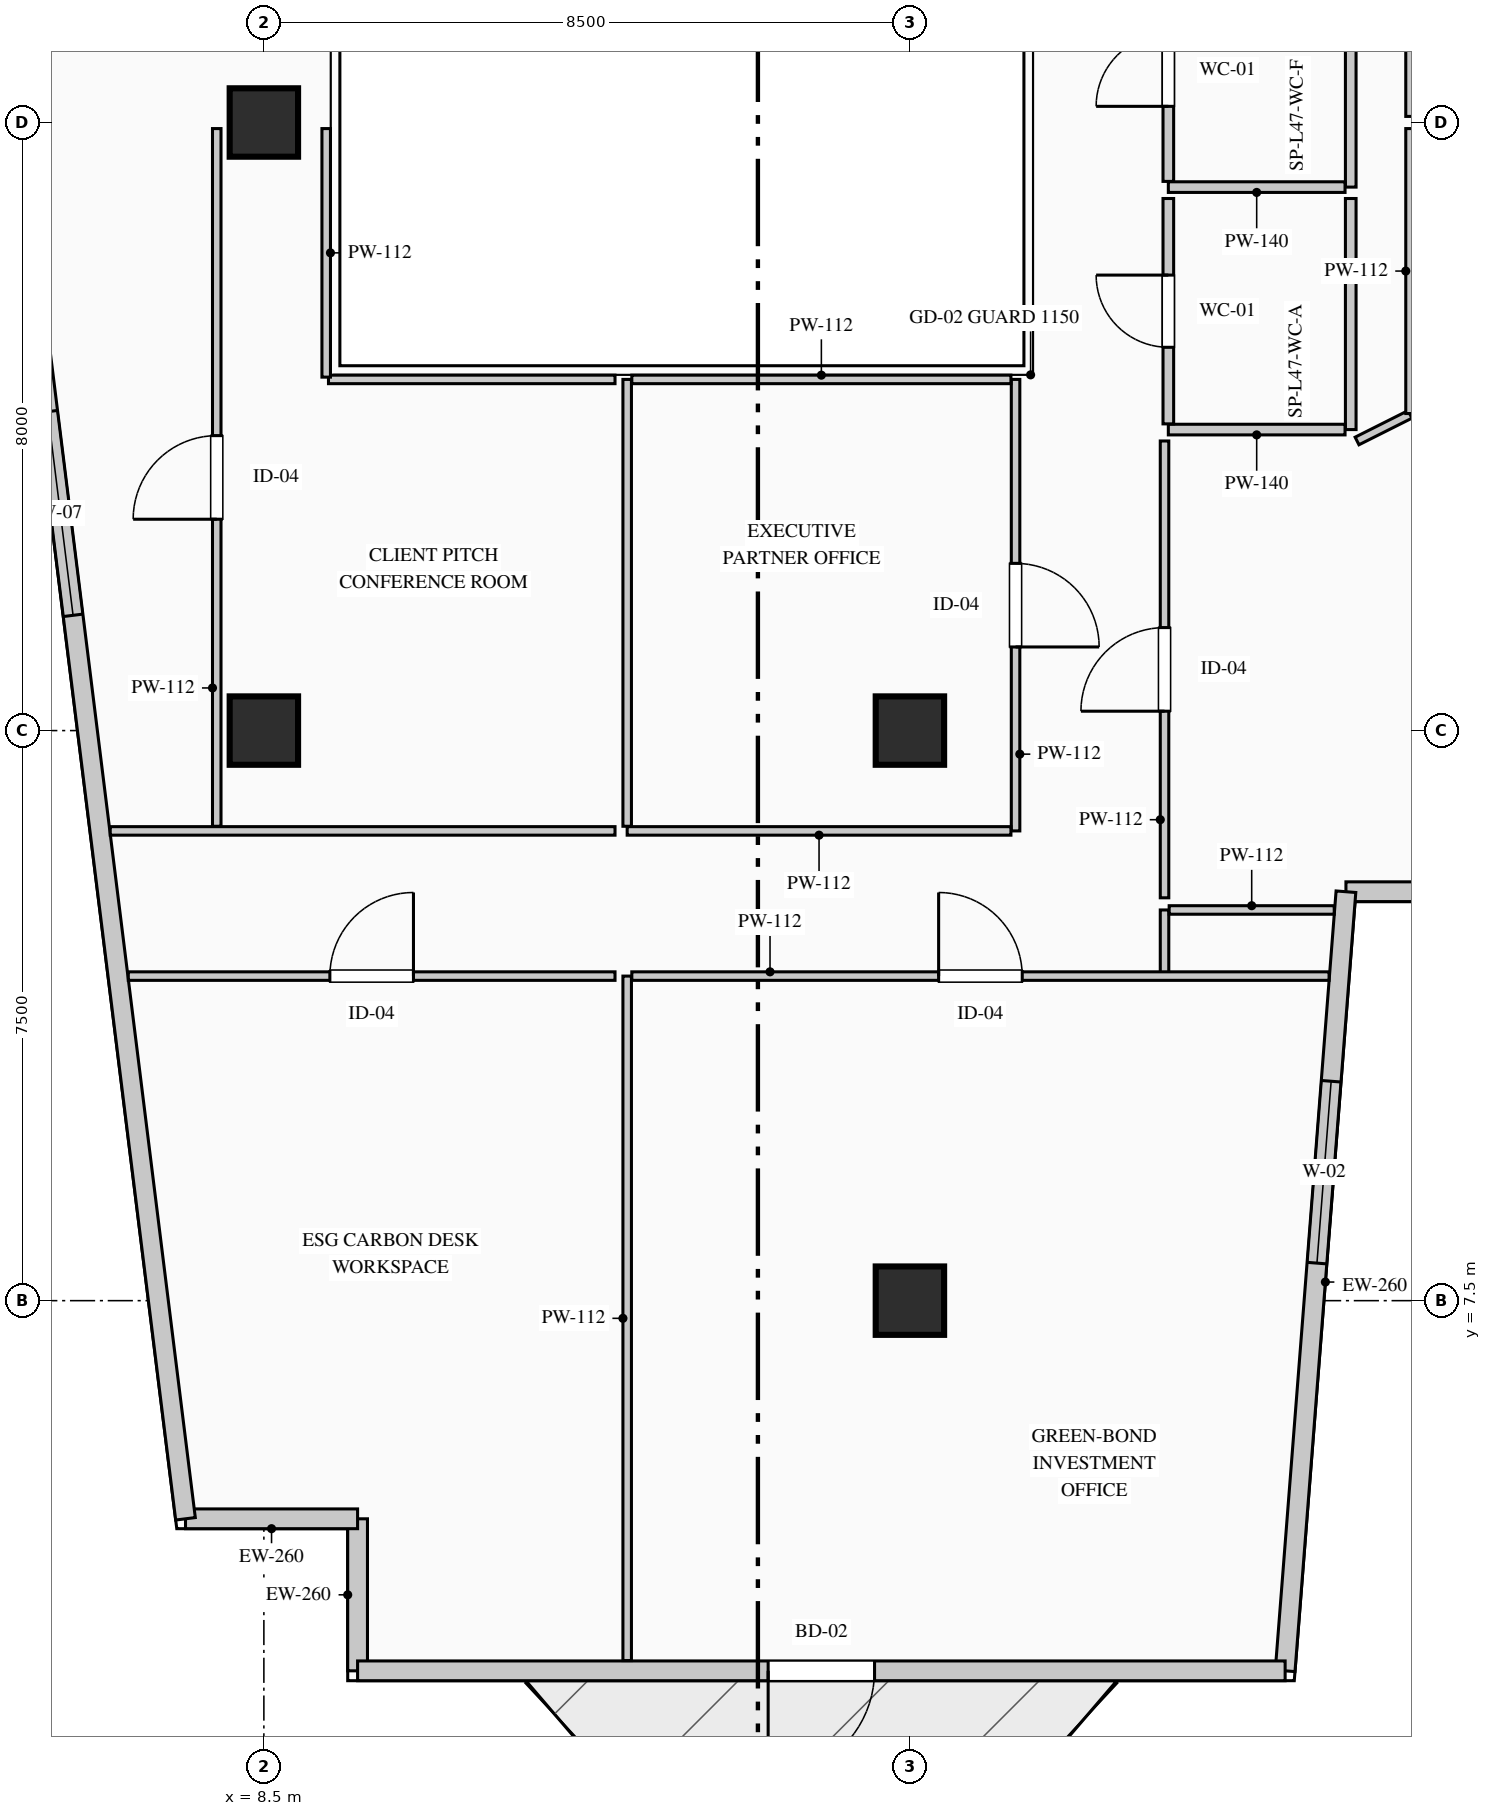
"""IFC4 building model, lengths in metres.
Left out: names, types, materials, properties, quantities, classifications, styles, units other than length and angle.
Written with IfcOpenShell. Run it as: python <this file> out.ifc"""

import sys

from ifc_helpers import new_model, si_unit, direction, frame, frame_2d, origin, origin_2d, place, context, subcontext, project, spatial, rectangle, extrude, element, fill, save


model = new_model("IFC4")
c1 = context("Model", 3, precision=1e-05, world=origin(), true_north=direction((0.0, 1.0)))
c2 = subcontext(c1, "Body", "Model", "MODEL_VIEW")
j1 = project(units=[si_unit("LENGTHUNIT", "METRE"), si_unit("PLANEANGLEUNIT", "RADIAN")], contexts=[c1])
p1 = place(None, origin())
s1 = spatial("IfcSite", under=j1, at=p1, CompositionType="ELEMENT")
p2 = place(p1, origin())
s2 = spatial("IfcBuilding", under=s1, at=p2, CompositionType="ELEMENT")
p3 = place(p2, frame((0.0, 0.0, 199.55)))
s3 = spatial("IfcBuildingStorey", under=s2, at=p3, CompositionType="ELEMENT", Elevation=199.55)
for number, where, z_axis, x_axis in (
    (1, (8.5, 15.0, 0.0), (0.0, 0.0, 1.0), (1.0, 0.0, 0.0)),
    (2, (8.5, 23.0, 0.0), (0.0, 0.0, 1.0), (1.0, 0.0, 0.0)),
    (3, (17.0, 7.5, 0.0), (0.0, 0.0, 1.0), (1.0, 0.0, 0.0)),
    (4, (17.0, 15.0, 0.0), (0.0, 0.0, 1.0), (1.0, 0.0, 0.0)),
):
    element("IfcColumn", number, at=place(p3, frame(where, z_axis=z_axis, x_axis=x_axis)), inside=s3, PredefinedType="COLUMN", context=c2, shape_type="SweptSolid", body=[
        extrude(rectangle(XDim=0.9, YDim=0.9, at=origin_2d()), origin(), (0.0, 0.0, 1.0), 3.95),
    ])
p4 = place(p3, frame((9.733, 2.63, 0.0), z_axis=(0.0, 0.0, 1.0), x_axis=(0.0, 1.0, 0.0)))
e5 = element("IfcWall", 5, at=p4, inside=s3, PredefinedType="STANDARD", context=c2, shape_type="SweptSolid", body=[
    extrude(rectangle(XDim=2.0, YDim=0.26, at=frame_2d((1.0, 0.0))), origin(), (0.0, 0.0, 1.0), 3.7),
])
p5 = place(p3, frame((9.733, 4.63, 0.0), z_axis=(0.0, 0.0, 1.0), x_axis=(-1.0, 0.0, 0.0)))
e6 = element("IfcWall", 6, at=p5, inside=s3, PredefinedType="STANDARD", context=c2, shape_type="SweptSolid", body=[
    extrude(rectangle(XDim=2.264, YDim=0.26, at=frame_2d((1.132, 0.0))), origin(), (0.0, 0.0, 1.0), 3.7),
])
p6 = place(p3, frame((7.469, 4.63, 0.0), z_axis=(0.0, 0.0, 1.0), x_axis=(-0.123515300309, 0.992342667928, 0.0)))
e7 = element("IfcWall", 7, at=p6, inside=s3, PredefinedType="STANDARD", context=c2, shape_type="SweptSolid", body=[
    extrude(rectangle(XDim=37.024, YDim=0.26, at=frame_2d((18.512, 0.0))), origin(), (0.0, 0.0, 1.0), 3.7),
])
p7 = place(p6, frame((11.978, 0.0, 0.9)))
e8 = element("IfcOpeningElement", 8, at=p7, cuts=e7, PredefinedType="OPENING", context=c2, shape_type="SweptSolid", body=[
    extrude(rectangle(XDim=2.7, YDim=2.1, at=frame_2d((1.35, 1.05))), frame((0.0, 0.14, 0.0), z_axis=(0.0, -1.0, 0.0), x_axis=(1.0, 0.0, 0.0)), (0.0, 0.0, 1.0), 0.28),
])
p8 = place(p3, frame((29.59, 12.88, 0.0), z_axis=(0.0, 0.0, 1.0), x_axis=(-1.0, 0.0, 0.0)))
e9 = element("IfcWall", 9, at=p8, inside=s3, PredefinedType="STANDARD", context=c2, shape_type="SweptSolid", body=[
    extrude(rectangle(XDim=6.853, YDim=0.26, at=frame_2d((3.426, 0.0))), origin(), (0.0, 0.0, 1.0), 3.7),
])
p9 = place(p8, frame((1.267, 0.0, 0.9)))
e10 = element("IfcOpeningElement", 10, at=p9, cuts=e9, PredefinedType="OPENING", context=c2, shape_type="SweptSolid", body=[
    extrude(rectangle(XDim=2.4, YDim=2.1, at=frame_2d((1.2, 1.05))), frame((0.0, 0.14, 0.0), z_axis=(0.0, -1.0, 0.0), x_axis=(1.0, 0.0, 0.0)), (0.0, 0.0, 1.0), 0.28),
])
p10 = place(p3, frame((22.737, 12.88, 0.0), z_axis=(0.0, 0.0, 1.0), x_axis=(-0.077816860153, -0.996967670627, 0.0)))
e11 = element("IfcWall", 11, at=p10, inside=s3, PredefinedType="STANDARD", context=c2, shape_type="SweptSolid", body=[
    extrude(rectangle(XDim=10.281, YDim=0.26, at=frame_2d((5.141, 0.0))), origin(), (0.0, 0.0, 1.0), 3.7),
])
p11 = place(p10, frame((2.501, 0.0, 0.9)))
e12 = element("IfcOpeningElement", 12, at=p11, cuts=e11, PredefinedType="OPENING", context=c2, shape_type="SweptSolid", body=[
    extrude(rectangle(XDim=2.4, YDim=2.1, at=frame_2d((1.2, 1.05))), frame((0.0, 0.14, 0.0), z_axis=(0.0, -1.0, 0.0), x_axis=(1.0, 0.0, 0.0)), (0.0, 0.0, 1.0), 0.28),
])
p12 = place(p3, frame((21.937, 2.63, 0.0), z_axis=(0.0, 0.0, 1.0), x_axis=(-1.0, 0.0, 0.0)))
e13 = element("IfcWall", 13, at=p12, inside=s3, PredefinedType="STANDARD", context=c2, shape_type="SweptSolid", body=[
    extrude(rectangle(XDim=12.204, YDim=0.26, at=frame_2d((6.102, 0.0))), origin(), (0.0, 0.0, 1.0), 3.7),
])
p13 = place(p12, frame((5.402, 0.0, 0.0)))
e14 = element("IfcOpeningElement", 14, at=p13, cuts=e13, PredefinedType="OPENING", context=c2, shape_type="SweptSolid", body=[
    extrude(rectangle(XDim=1.4, YDim=2.2, at=frame_2d((0.7, 1.1))), frame((0.0, 0.14, 0.0), z_axis=(0.0, -1.0, 0.0), x_axis=(1.0, 0.0, 0.0)), (0.0, 0.0, 1.0), 0.28),
])
p14 = place(p3, frame((22.8, 25.15, 0.0), z_axis=(0.0, 0.0, 1.0), x_axis=(0.0, -1.0, 0.0)))
e15 = element("IfcWall", 15, at=p14, inside=s3, PredefinedType="PARTITIONING", context=c2, shape_type="SweptSolid", body=[
    extrude(rectangle(XDim=3.0, YDim=0.14, at=frame_2d((1.5, 0.0))), origin(), (0.0, 0.0, 1.0), 3.285),
])
p15 = place(p3, frame((22.725, 22.15, 0.0), z_axis=(0.0, 0.0, 1.0), x_axis=(-1.0, 0.0, 0.0)))
e16 = element("IfcWall", 16, at=p15, inside=s3, PredefinedType="PARTITIONING", context=c2, shape_type="SweptSolid", body=[
    extrude(rectangle(XDim=2.325, YDim=0.14, at=frame_2d((1.163, 0.0))), origin(), (0.0, 0.0, 1.0), 3.7),
])
p16 = place(p3, frame((20.4, 22.225, 0.0), z_axis=(0.0, 0.0, 1.0), x_axis=(0.0, 1.0, 0.0)))
e17 = element("IfcWall", 17, at=p16, inside=s3, PredefinedType="PARTITIONING", context=c2, shape_type="SweptSolid", body=[
    extrude(rectangle(XDim=2.925, YDim=0.14, at=frame_2d((1.462, 0.0))), origin(), (0.0, 0.0, 1.0), 3.7),
])
p17 = place(p16, frame((0.988, 0.0, 0.0)))
e18 = element("IfcOpeningElement", 18, at=p17, cuts=e17, PredefinedType="OPENING", context=c2, shape_type="SweptSolid", body=[
    extrude(rectangle(XDim=0.95, YDim=2.15, at=frame_2d((0.475, 1.075))), frame((0.0, 0.08, 0.0), z_axis=(0.0, -1.0, 0.0), x_axis=(1.0, 0.0, 0.0)), (0.0, 0.0, 1.0), 0.16),
])
p18 = place(p3, frame((22.8, 22.0, 0.0), z_axis=(0.0, 0.0, 1.0), x_axis=(0.0, -1.0, 0.0)))
e19 = element("IfcWall", 19, at=p18, inside=s3, PredefinedType="PARTITIONING", context=c2, shape_type="SweptSolid", body=[
    extrude(rectangle(XDim=3.04, YDim=0.14, at=frame_2d((1.52, 0.0))), origin(), (0.0, 0.0, 1.0), 3.285),
])
p19 = place(p3, frame((22.725, 18.96, 0.0), z_axis=(0.0, 0.0, 1.0), x_axis=(-1.0, 0.0, 0.0)))
e20 = element("IfcWall", 20, at=p19, inside=s3, PredefinedType="PARTITIONING", context=c2, shape_type="SweptSolid", body=[
    extrude(rectangle(XDim=2.325, YDim=0.14, at=frame_2d((1.163, 0.0))), origin(), (0.0, 0.0, 1.0), 3.7),
])
p20 = place(p3, frame((20.4, 19.035, 0.0), z_axis=(0.0, 0.0, 1.0), x_axis=(0.0, 1.0, 0.0)))
e21 = element("IfcWall", 21, at=p20, inside=s3, PredefinedType="PARTITIONING", context=c2, shape_type="SweptSolid", body=[
    extrude(rectangle(XDim=2.965, YDim=0.14, at=frame_2d((1.482, 0.0))), origin(), (0.0, 0.0, 1.0), 3.7),
])
p21 = place(p20, frame((1.008, 0.0, 0.0)))
e22 = element("IfcOpeningElement", 22, at=p21, cuts=e21, PredefinedType="OPENING", context=c2, shape_type="SweptSolid", body=[
    extrude(rectangle(XDim=0.95, YDim=2.15, at=frame_2d((0.475, 1.075))), frame((0.0, 0.08, 0.0), z_axis=(0.0, -1.0, 0.0), x_axis=(1.0, 0.0, 0.0)), (0.0, 0.0, 1.0), 0.16),
])
p22 = place(p3, frame((20.35, 11.8, 0.0), z_axis=(0.0, 0.0, 1.0), x_axis=(0.0, 1.0, 0.0)))
e23 = element("IfcWall", 23, at=p22, inside=s3, PredefinedType="PARTITIONING", context=c2, shape_type="SweptSolid", body=[
    extrude(rectangle(XDim=0.84, YDim=0.112, at=frame_2d((0.42, 0.0))), origin(), (0.0, 0.0, 1.0), 3.7),
])
p23 = place(p3, frame((20.411, 12.64, 0.0), z_axis=(0.0, 0.0, 1.0), x_axis=(1.0, 0.0, 0.0)))
e24 = element("IfcWall", 24, at=p23, inside=s3, PredefinedType="PARTITIONING", context=c2, shape_type="SweptSolid", body=[
    extrude(rectangle(XDim=2.172, YDim=0.112, at=frame_2d((1.086, 0.0))), origin(), (0.0, 0.0, 1.0), 3.7),
])
p24 = place(p3, frame((13.28, 2.765, 0.0), z_axis=(0.0, 0.0, 1.0), x_axis=(0.0, 1.0, 0.0)))
e25 = element("IfcWall", 25, at=p24, inside=s3, PredefinedType="PARTITIONING", context=c2, shape_type="SweptSolid", body=[
    extrude(rectangle(XDim=9.005, YDim=0.112, at=frame_2d((4.502, 0.0))), origin(), (0.0, 0.0, 1.0), 3.7),
])
p25 = place(p3, frame((13.341, 11.77, 0.0), z_axis=(0.0, 0.0, 1.0), x_axis=(1.0, 0.0, 0.0)))
e26 = element("IfcWall", 26, at=p25, inside=s3, PredefinedType="PARTITIONING", context=c2, shape_type="SweptSolid", body=[
    extrude(rectangle(XDim=9.174, YDim=0.112, at=frame_2d((4.587, 0.0))), origin(), (0.0, 0.0, 1.0), 3.7),
])
p26 = place(p25, frame((4.037, 0.0, 0.0)))
e27 = element("IfcOpeningElement", 27, at=p26, cuts=e26, PredefinedType="OPENING", context=c2, shape_type="SweptSolid", body=[
    extrude(rectangle(XDim=1.1, YDim=2.2, at=frame_2d((0.55, 1.1))), frame((0.0, 0.066, 0.0), z_axis=(0.0, -1.0, 0.0), x_axis=(1.0, 0.0, 0.0)), (0.0, 0.0, 1.0), 0.132),
])
p27 = place(p3, frame((6.716, 11.77, 0.0), z_axis=(0.0, 0.0, 1.0), x_axis=(1.0, 0.0, 0.0)))
e28 = element("IfcWall", 28, at=p27, inside=s3, PredefinedType="PARTITIONING", context=c2, shape_type="SweptSolid", body=[
    extrude(rectangle(XDim=6.404, YDim=0.112, at=frame_2d((3.202, 0.0))), origin(), (0.0, 0.0, 1.0), 3.7),
])
p28 = place(p27, frame((2.652, 0.0, 0.0)))
e29 = element("IfcOpeningElement", 29, at=p28, cuts=e28, PredefinedType="OPENING", context=c2, shape_type="SweptSolid", body=[
    extrude(rectangle(XDim=1.1, YDim=2.2, at=frame_2d((0.55, 1.1))), frame((0.0, 0.066, 0.0), z_axis=(0.0, -1.0, 0.0), x_axis=(1.0, 0.0, 0.0)), (0.0, 0.0, 1.0), 0.132),
])
p29 = place(p3, frame((20.35, 12.8, 0.0), z_axis=(0.0, 0.0, 1.0), x_axis=(0.0, 1.0, 0.0)))
e30 = element("IfcWall", 30, at=p29, inside=s3, PredefinedType="PARTITIONING", context=c2, shape_type="SweptSolid", body=[
    extrude(rectangle(XDim=6.01, YDim=0.112, at=frame_2d((3.005, 0.0))), origin(), (0.0, 0.0, 1.0), 3.7),
])
p30 = place(p29, frame((2.455, 0.0, 0.0)))
e31 = element("IfcOpeningElement", 31, at=p30, cuts=e30, PredefinedType="OPENING", context=c2, shape_type="SweptSolid", body=[
    extrude(rectangle(XDim=1.1, YDim=2.2, at=frame_2d((0.55, 1.1))), frame((0.0, 0.066, 0.0), z_axis=(0.0, -1.0, 0.0), x_axis=(1.0, 0.0, 0.0)), (0.0, 0.0, 1.0), 0.132),
])
p31 = place(p3, frame((22.883, 18.81, 0.0), z_axis=(0.0, 0.0, 1.0), x_axis=(0.893737436086, 0.448590453909, 0.0)))
e32 = element("IfcWall", 32, at=p31, inside=s3, PredefinedType="PARTITIONING", context=c2, shape_type="SweptSolid", body=[
    extrude(rectangle(XDim=0.78, YDim=0.112, at=frame_2d((0.39, 0.0))), origin(), (0.0, 0.0, 1.0), 3.7),
])
p32 = place(p3, frame((23.58, 19.171, 0.0), z_axis=(0.0, 0.0, 1.0), x_axis=(0.0, 1.0, 0.0)))
e33 = element("IfcWall", 33, at=p32, inside=s3, PredefinedType="PARTITIONING", context=c2, shape_type="SweptSolid", body=[
    extrude(rectangle(XDim=3.749, YDim=0.112, at=frame_2d((1.875, 0.0))), origin(), (0.0, 0.0, 1.0), 3.7),
])
p33 = place(p3, frame((18.39, 19.62, 0.0), z_axis=(0.0, 0.0, 1.0), x_axis=(0.0, -1.0, 0.0)))
e34 = element("IfcWall", 34, at=p33, inside=s3, PredefinedType="PARTITIONING", context=c2, shape_type="SweptSolid", body=[
    extrude(rectangle(XDim=5.94, YDim=0.112, at=frame_2d((2.97, 0.0))), origin(), (0.0, 0.0, 1.0), 3.7),
])
p34 = place(p33, frame((2.42, 0.0, 0.0)))
e35 = element("IfcOpeningElement", 35, at=p34, cuts=e34, PredefinedType="OPENING", context=c2, shape_type="SweptSolid", body=[
    extrude(rectangle(XDim=1.1, YDim=2.2, at=frame_2d((0.55, 1.1))), frame((0.0, 0.066, 0.0), z_axis=(0.0, -1.0, 0.0), x_axis=(1.0, 0.0, 0.0)), (0.0, 0.0, 1.0), 0.132),
])
p35 = place(p3, frame((18.329, 13.68, 0.0), z_axis=(0.0, 0.0, 1.0), x_axis=(-1.0, 0.0, 0.0)))
e36 = element("IfcWall", 36, at=p35, inside=s3, PredefinedType="PARTITIONING", context=c2, shape_type="SweptSolid", body=[
    extrude(rectangle(XDim=5.049, YDim=0.112, at=frame_2d((2.524, 0.0))), origin(), (0.0, 0.0, 1.0), 3.7),
])
p36 = place(p3, frame((13.28, 13.741, 0.0), z_axis=(0.0, 0.0, 1.0), x_axis=(0.0, 1.0, 0.0)))
e37 = element("IfcWall", 37, at=p36, inside=s3, PredefinedType="PARTITIONING", context=c2, shape_type="SweptSolid", body=[
    extrude(rectangle(XDim=5.879, YDim=0.112, at=frame_2d((2.939, 0.0))), origin(), (0.0, 0.0, 1.0), 3.7),
])
p37 = place(p3, frame((13.341, 19.62, 0.0), z_axis=(0.0, 0.0, 1.0), x_axis=(1.0, 0.0, 0.0)))
e38 = element("IfcWall", 38, at=p37, inside=s3, PredefinedType="PARTITIONING", context=c2, shape_type="SweptSolid", body=[
    extrude(rectangle(XDim=4.988, YDim=0.112, at=frame_2d((2.494, 0.0))), origin(), (0.0, 0.0, 1.0), 3.7),
])
p38 = place(p3, frame((9.35, 19.62, 0.0), z_axis=(0.0, 0.0, 1.0), x_axis=(1.0, 0.0, 0.0)))
e39 = element("IfcWall", 39, at=p38, inside=s3, PredefinedType="PARTITIONING", context=c2, shape_type="SweptSolid", body=[
    extrude(rectangle(XDim=3.77, YDim=0.112, at=frame_2d((1.885, 0.0))), origin(), (0.0, 0.0, 1.0), 3.7),
])
p39 = place(p3, frame((13.12, 13.68, 0.0), z_axis=(0.0, 0.0, 1.0), x_axis=(-1.0, 0.0, 0.0)))
e40 = element("IfcWall", 40, at=p39, inside=s3, PredefinedType="PARTITIONING", context=c2, shape_type="SweptSolid", body=[
    extrude(rectangle(XDim=6.642, YDim=0.112, at=frame_2d((3.321, 0.0))), origin(), (0.0, 0.0, 1.0), 3.7),
])
p40 = place(p3, frame((7.88, 13.741, 0.0), z_axis=(0.0, 0.0, 1.0), x_axis=(0.0, 1.0, 0.0)))
e41 = element("IfcWall", 41, at=p40, inside=s3, PredefinedType="PARTITIONING", context=c2, shape_type="SweptSolid", body=[
    extrude(rectangle(XDim=9.179, YDim=0.112, at=frame_2d((4.589, 0.0))), origin(), (0.0, 0.0, 1.0), 3.7),
])
p41 = place(p40, frame((4.04, 0.0, 0.0)))
e42 = element("IfcOpeningElement", 42, at=p41, cuts=e41, PredefinedType="OPENING", context=c2, shape_type="SweptSolid", body=[
    extrude(rectangle(XDim=1.1, YDim=2.2, at=frame_2d((0.55, 1.1))), frame((0.0, 0.066, 0.0), z_axis=(0.0, -1.0, 0.0), x_axis=(1.0, 0.0, 0.0)), (0.0, 0.0, 1.0), 0.132),
])
p42 = place(p3, frame((9.32, 22.92, 0.0), z_axis=(0.0, 0.0, 1.0), x_axis=(0.0, -1.0, 0.0)))
e43 = element("IfcWall", 43, at=p42, inside=s3, PredefinedType="PARTITIONING", context=c2, shape_type="SweptSolid", body=[
    extrude(rectangle(XDim=3.27, YDim=0.112, at=frame_2d((1.635, 0.0))), origin(), (0.0, 0.0, 1.0), 3.485),
])
p43 = place(p3, frame((23.58, 23.08, 0.0), z_axis=(0.0, 0.0, 1.0), x_axis=(0.0, 1.0, 0.0)))
e44 = element("IfcWall", 44, at=p43, inside=s3, PredefinedType="PARTITIONING", context=c2, shape_type="SweptSolid", body=[
    extrude(rectangle(XDim=5.94, YDim=0.112, at=frame_2d((2.97, 0.0))), origin(), (0.0, 0.0, 1.0), 3.7),
])
p44 = place(p7, origin())
e45 = element("IfcWindow", 45, at=p44, inside=s3, PartitioningType="DOUBLE_PANEL_VERTICAL", PredefinedType="WINDOW", context=c2, shape_type="SweptSolid", body=[
    extrude(rectangle(XDim=2.7, YDim=2.1, at=frame_2d((1.35, 1.05))), frame((0.0, 0.03, 0.0), z_axis=(0.0, -1.0, 0.0), x_axis=(1.0, 0.0, 0.0)), (0.0, 0.0, 1.0), 0.06),
])
fill(e8, e45)
p45 = place(p11, origin())
e46 = element("IfcWindow", 46, at=p45, inside=s3, PartitioningType="DOUBLE_PANEL_VERTICAL", PredefinedType="WINDOW", context=c2, shape_type="SweptSolid", body=[
    extrude(rectangle(XDim=2.4, YDim=2.1, at=frame_2d((1.2, 1.05))), frame((0.0, 0.03, 0.0), z_axis=(0.0, -1.0, 0.0), x_axis=(1.0, 0.0, 0.0)), (0.0, 0.0, 1.0), 0.06),
])
fill(e12, e46)
p46 = place(p13, origin())
e47 = element("IfcDoor", 47, at=p46, inside=s3, OperationType="SINGLE_SWING_RIGHT", PredefinedType="DOOR", context=c2, shape_type="SweptSolid", body=[
    extrude(rectangle(XDim=1.4, YDim=2.2, at=frame_2d((0.7, 1.1))), frame((0.0, 0.025, 0.0), z_axis=(0.0, -1.0, 0.0), x_axis=(1.0, 0.0, 0.0)), (0.0, 0.0, 1.0), 0.05),
])
fill(e14, e47)
p47 = place(p17, origin())
e48 = element("IfcDoor", 48, at=p47, inside=s3, OperationType="SINGLE_SWING_LEFT", PredefinedType="DOOR", context=c2, shape_type="SweptSolid", body=[
    extrude(rectangle(XDim=0.95, YDim=2.15, at=frame_2d((0.475, 1.075))), frame((0.0, 0.025, 0.0), z_axis=(0.0, -1.0, 0.0), x_axis=(1.0, 0.0, 0.0)), (0.0, 0.0, 1.0), 0.05),
])
fill(e18, e48)
p48 = place(p21, origin())
e49 = element("IfcDoor", 49, at=p48, inside=s3, OperationType="SINGLE_SWING_RIGHT", PredefinedType="DOOR", context=c2, shape_type="SweptSolid", body=[
    extrude(rectangle(XDim=0.95, YDim=2.15, at=frame_2d((0.475, 1.075))), frame((0.0, 0.025, 0.0), z_axis=(0.0, -1.0, 0.0), x_axis=(1.0, 0.0, 0.0)), (0.0, 0.0, 1.0), 0.05),
])
fill(e22, e49)
p49 = place(p26, origin())
e50 = element("IfcDoor", 50, at=p49, inside=s3, OperationType="SINGLE_SWING_LEFT", PredefinedType="DOOR", context=c2, shape_type="SweptSolid", body=[
    extrude(rectangle(XDim=1.1, YDim=2.2, at=frame_2d((0.55, 1.1))), frame((0.0, 0.025, 0.0), z_axis=(0.0, -1.0, 0.0), x_axis=(1.0, 0.0, 0.0)), (0.0, 0.0, 1.0), 0.05),
])
fill(e27, e50)
p50 = place(p28, origin())
e51 = element("IfcDoor", 51, at=p50, inside=s3, OperationType="SINGLE_SWING_RIGHT", PredefinedType="DOOR", context=c2, shape_type="SweptSolid", body=[
    extrude(rectangle(XDim=1.1, YDim=2.2, at=frame_2d((0.55, 1.1))), frame((0.0, 0.025, 0.0), z_axis=(0.0, -1.0, 0.0), x_axis=(1.0, 0.0, 0.0)), (0.0, 0.0, 1.0), 0.05),
])
fill(e29, e51)
p51 = place(p30, origin())
e52 = element("IfcDoor", 52, at=p51, inside=s3, OperationType="SINGLE_SWING_LEFT", PredefinedType="DOOR", context=c2, shape_type="SweptSolid", body=[
    extrude(rectangle(XDim=1.1, YDim=2.2, at=frame_2d((0.55, 1.1))), frame((0.0, 0.025, 0.0), z_axis=(0.0, -1.0, 0.0), x_axis=(1.0, 0.0, 0.0)), (0.0, 0.0, 1.0), 0.05),
])
fill(e31, e52)
p52 = place(p34, origin())
e53 = element("IfcDoor", 53, at=p52, inside=s3, OperationType="SINGLE_SWING_RIGHT", PredefinedType="DOOR", context=c2, shape_type="SweptSolid", body=[
    extrude(rectangle(XDim=1.1, YDim=2.2, at=frame_2d((0.55, 1.1))), frame((0.0, 0.025, 0.0), z_axis=(0.0, -1.0, 0.0), x_axis=(1.0, 0.0, 0.0)), (0.0, 0.0, 1.0), 0.05),
])
fill(e35, e53)
p53 = place(p41, origin())
e54 = element("IfcDoor", 54, at=p53, inside=s3, OperationType="SINGLE_SWING_LEFT", PredefinedType="DOOR", context=c2, shape_type="SweptSolid", body=[
    extrude(rectangle(XDim=1.1, YDim=2.2, at=frame_2d((0.55, 1.1))), frame((0.0, 0.025, 0.0), z_axis=(0.0, -1.0, 0.0), x_axis=(1.0, 0.0, 0.0)), (0.0, 0.0, 1.0), 0.05),
])
fill(e42, e54)
save(model, sys.argv[1])
